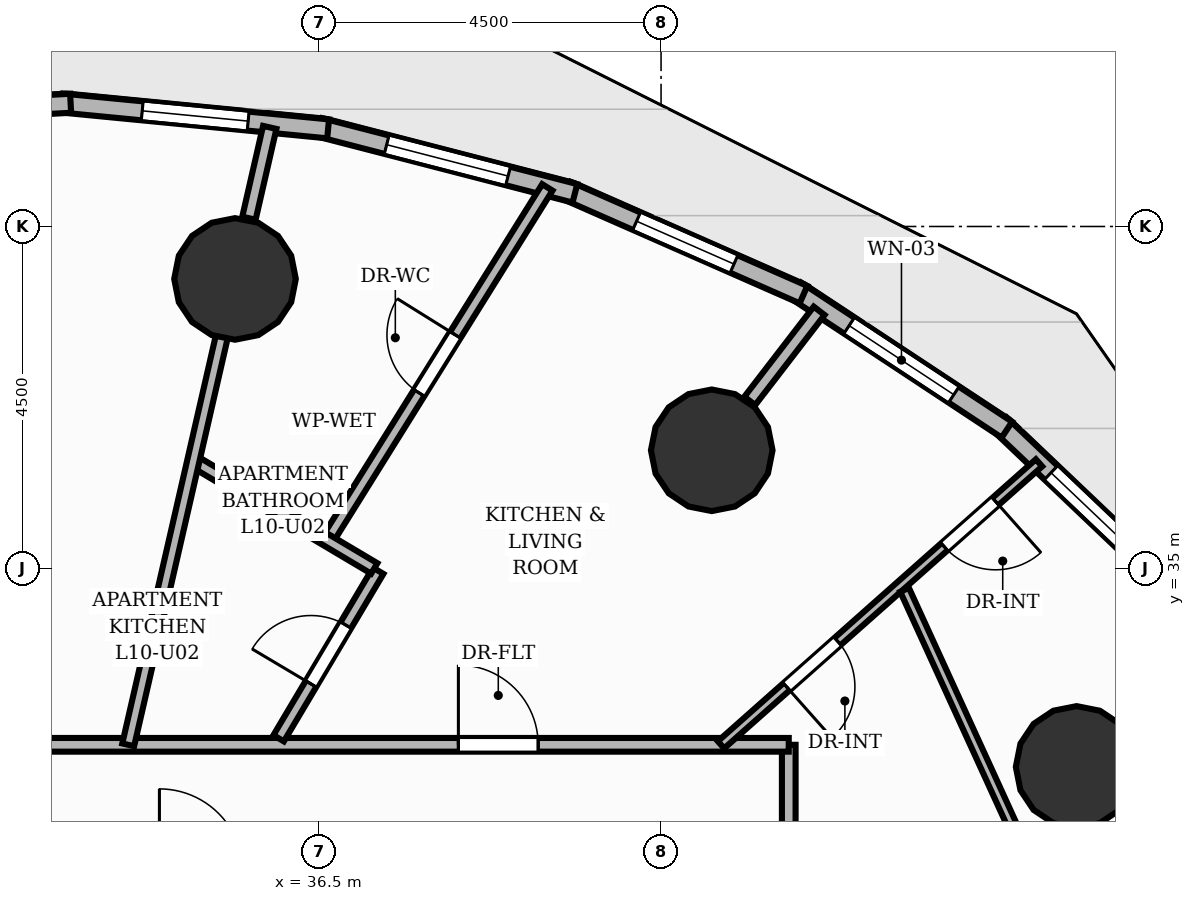
"""IFC4 building model, lengths in metres.
Left out: names, types, materials, properties, quantities, classifications, styles, units other than length and angle.
Written with IfcOpenShell. Run it as: python <this file> out.ifc"""

import sys

from ifc_helpers import new_model, si_unit, direction, frame, frame_2d, origin, origin_2d, place, context, subcontext, project, spatial, rectangle, circle, extrude, element, fill, save


model = new_model("IFC4")
c1 = context("Model", 3, precision=1e-05, world=origin(), true_north=direction((0.0, 1.0)))
c2 = subcontext(c1, "Body", "Model", "MODEL_VIEW")
j1 = project(units=[si_unit("LENGTHUNIT", "METRE"), si_unit("PLANEANGLEUNIT", "RADIAN")], contexts=[c1])
p1 = place(None, origin())
s1 = spatial("IfcSite", under=j1, at=p1, CompositionType="ELEMENT")
p2 = place(p1, origin())
s2 = spatial("IfcBuilding", under=s1, at=p2, CompositionType="ELEMENT")
p3 = place(p2, frame((0.0, 0.0, 37.6)))
s3 = spatial("IfcBuildingStorey", under=s2, at=p3, CompositionType="ELEMENT", Elevation=37.6)
for number, where, z_axis, x_axis in (
    (1, (46.468, 32.389, 0.0), (0.0, 0.0, 1.0), (1.0, 0.0, 0.0)),
    (2, (41.667, 36.555, 0.0), (0.0, 0.0, 1.0), (1.0, 0.0, 0.0)),
    (3, (35.395, 38.81, 0.0), (0.0, 0.0, 1.0), (1.0, 0.0, 0.0)),
):
    element("IfcColumn", number, at=place(p3, frame(where, z_axis=z_axis, x_axis=x_axis)), inside=s3, PredefinedType="COLUMN", context=c2, shape_type="SweptSolid", body=[
        extrude(circle(Radius=0.8, at=origin_2d()), origin(), (0.0, 0.0, 1.0), 3.2),
    ])
p4 = place(p3, frame((45.462, 36.896, 0.0), z_axis=(0.0, 0.0, 1.0), x_axis=(0.724569059836, -0.689202203659, 0.0)))
e4 = element("IfcWall", 4, at=p4, inside=s3, PredefinedType="SOLIDWALL", context=c2, shape_type="SweptSolid", body=[
    extrude(rectangle(XDim=3.244, YDim=0.25, at=frame_2d((1.622, 0.0))), origin(), (0.0, 0.0, 1.0), 2.96),
])
p5 = place(p4, frame((0.922, 0.0, 0.85)))
e5 = element("IfcOpeningElement", 5, at=p5, cuts=e4, PredefinedType="OPENING", context=c2, shape_type="SweptSolid", body=[
    extrude(rectangle(XDim=1.4, YDim=1.55, at=frame_2d((0.7, 0.775))), frame((0.0, 0.135, 0.0), z_axis=(0.0, -1.0, 0.0), x_axis=(1.0, 0.0, 0.0)), (0.0, 0.0, 1.0), 0.27),
])
p6 = place(p3, frame((42.777, 38.656, 0.0), z_axis=(0.0, 0.0, 1.0), x_axis=(0.834663448541, -0.550760317805, 0.0)))
e6 = element("IfcWall", 6, at=p6, inside=s3, PredefinedType="SOLIDWALL", context=c2, shape_type="SweptSolid", body=[
    extrude(rectangle(XDim=3.323, YDim=0.25, at=frame_2d((1.661, 0.0))), origin(), (0.0, 0.0, 1.0), 2.96),
])
p7 = place(p6, frame((0.836, 0.0, 0.85)))
e7 = element("IfcOpeningElement", 7, at=p7, cuts=e6, PredefinedType="OPENING", context=c2, shape_type="SweptSolid", body=[
    extrude(rectangle(XDim=1.65, YDim=1.55, at=frame_2d((0.825, 0.775))), frame((0.0, 0.135, 0.0), z_axis=(0.0, -1.0, 0.0), x_axis=(1.0, 0.0, 0.0)), (0.0, 0.0, 1.0), 0.27),
])
p8 = place(p3, frame((39.763, 39.972, 0.0), z_axis=(0.0, 0.0, 1.0), x_axis=(0.915312914138, -0.402743428515, 0.0)))
e8 = element("IfcWall", 8, at=p8, inside=s3, PredefinedType="SOLIDWALL", context=c2, shape_type="SweptSolid", body=[
    extrude(rectangle(XDim=3.399, YDim=0.25, at=frame_2d((1.699, 0.0))), origin(), (0.0, 0.0, 1.0), 2.96),
])
p9 = place(p8, frame((1.0, 0.0, 0.85)))
e9 = element("IfcOpeningElement", 9, at=p9, cuts=e8, PredefinedType="OPENING", context=c2, shape_type="SweptSolid", body=[
    extrude(rectangle(XDim=1.4, YDim=1.55, at=frame_2d((0.7, 0.775))), frame((0.0, 0.135, 0.0), z_axis=(0.0, -1.0, 0.0), x_axis=(1.0, 0.0, 0.0)), (0.0, 0.0, 1.0), 0.27),
])
p10 = place(p3, frame((36.512, 40.803, 0.0), z_axis=(0.0, 0.0, 1.0), x_axis=(0.968176058434, -0.250270093848, 0.0)))
e10 = element("IfcWall", 10, at=p10, inside=s3, PredefinedType="SOLIDWALL", context=c2, shape_type="SweptSolid", body=[
    extrude(rectangle(XDim=3.465, YDim=0.25, at=frame_2d((1.732, 0.0))), origin(), (0.0, 0.0, 1.0), 2.96),
])
p11 = place(p10, frame((0.907, 0.0, 0.85)))
e11 = element("IfcOpeningElement", 11, at=p11, cuts=e10, PredefinedType="OPENING", context=c2, shape_type="SweptSolid", body=[
    extrude(rectangle(XDim=1.65, YDim=1.55, at=frame_2d((0.825, 0.775))), frame((0.0, 0.135, 0.0), z_axis=(0.0, -1.0, 0.0), x_axis=(1.0, 0.0, 0.0)), (0.0, 0.0, 1.0), 0.27),
])
p12 = place(p3, frame((33.123, 41.124, 0.0), z_axis=(0.0, 0.0, 1.0), x_axis=(0.995323323337, -0.096599596386, 0.0)))
e12 = element("IfcWall", 12, at=p12, inside=s3, PredefinedType="SOLIDWALL", context=c2, shape_type="SweptSolid", body=[
    extrude(rectangle(XDim=3.513, YDim=0.25, at=frame_2d((1.756, 0.0))), origin(), (0.0, 0.0, 1.0), 2.96),
])
p13 = place(p12, frame((1.056, 0.0, 0.85)))
e13 = element("IfcOpeningElement", 13, at=p13, cuts=e12, PredefinedType="OPENING", context=c2, shape_type="SweptSolid", body=[
    extrude(rectangle(XDim=1.4, YDim=1.29, at=frame_2d((0.7, 0.645))), frame((0.0, 0.135, 0.0), z_axis=(0.0, -1.0, 0.0), x_axis=(1.0, 0.0, 0.0)), (0.0, 0.0, 1.0), 0.27),
])
p14 = place(p3, frame((29.699, 40.923, 0.0), z_axis=(0.0, 0.0, 1.0), x_axis=(0.998425121055, 0.056100602904, 0.0)))
e14 = element("IfcWall", 14, at=p14, inside=s3, PredefinedType="SOLIDWALL", context=c2, shape_type="SweptSolid", body=[
    extrude(rectangle(XDim=3.538, YDim=0.25, at=frame_2d((1.769, 0.0))), origin(), (0.0, 0.0, 1.0), 2.96),
])
p15 = place(p14, frame((1.194, 0.0, 0.0)))
e15 = element("IfcOpeningElement", 15, at=p15, cuts=e14, PredefinedType="OPENING", context=c2, shape_type="SweptSolid", body=[
    extrude(rectangle(XDim=1.15, YDim=2.2, at=frame_2d((0.575, 1.1))), frame((0.0, 0.135, 0.0), z_axis=(0.0, -1.0, 0.0), x_axis=(1.0, 0.0, 0.0)), (0.0, 0.0, 1.0), 0.27),
])
p16 = place(p3, frame((42.167, 37.205, 0.0), z_axis=(0.0, 0.0, 1.0), x_axis=(0.609978856004, 0.792417689876, 0.0)))
e16 = element("IfcWall", 16, at=p16, inside=s3, PredefinedType="PARTITIONING", context=c2, shape_type="SweptSolid", body=[
    extrude(rectangle(XDim=1.496, YDim=0.18, at=frame_2d((0.748, 0.0))), origin(), (0.0, 0.0, 1.0), 2.178),
])
p17 = place(p3, frame((35.578, 39.609, 0.0), z_axis=(0.0, 0.0, 1.0), x_axis=(0.223317008343, 0.974745871386, 0.0)))
e17 = element("IfcWall", 17, at=p17, inside=s3, PredefinedType="PARTITIONING", context=c2, shape_type="SweptSolid", body=[
    extrude(rectangle(XDim=1.226, YDim=0.18, at=frame_2d((0.613, 0.0))), origin(), (0.0, 0.0, 1.0), 2.178),
])
p18 = place(p3, frame((42.68, 32.68, 0.0), z_axis=(0.0, 0.0, 1.0), x_axis=(0.0, -1.0, 0.0)))
e18 = element("IfcWall", 18, at=p18, inside=s3, PredefinedType="PARTITIONING", context=c2, shape_type="SweptSolid", body=[
    extrude(rectangle(XDim=10.065, YDim=0.18, at=frame_2d((5.032, 0.0))), origin(), (0.0, 0.0, 1.0), 2.955),
])
p19 = place(p18, frame((7.374, 0.0, 0.0)))
e19 = element("IfcOpeningElement", 19, at=p19, cuts=e18, PredefinedType="OPENING", context=c2, shape_type="SweptSolid", body=[
    extrude(rectangle(XDim=0.9, YDim=2.1, at=frame_2d((0.45, 1.05))), frame((0.0, 0.1, 0.0), z_axis=(0.0, -1.0, 0.0), x_axis=(1.0, 0.0, 0.0)), (0.0, 0.0, 1.0), 0.2),
])
p20 = place(p3, frame((21.32, 32.68, 0.0), z_axis=(0.0, 0.0, 1.0), x_axis=(1.0, 0.0, 0.0)))
e20 = element("IfcWall", 20, at=p20, inside=s3, PredefinedType="PARTITIONING", context=c2, shape_type="SweptSolid", body=[
    extrude(rectangle(XDim=21.36, YDim=0.18, at=frame_2d((10.68, 0.0))), origin(), (0.0, 0.0, 1.0), 2.955),
])
p21 = place(p20, frame((17.013, 0.0, 0.0)))
e21 = element("IfcOpeningElement", 21, at=p21, cuts=e20, PredefinedType="OPENING", context=c2, shape_type="SweptSolid", body=[
    extrude(rectangle(XDim=1.05, YDim=2.15, at=frame_2d((0.525, 1.075))), frame((0.0, 0.1, 0.0), z_axis=(0.0, -1.0, 0.0), x_axis=(1.0, 0.0, 0.0)), (0.0, 0.0, 1.0), 0.2),
])
p22 = place(p20, frame((5.82, 0.0, 0.0)))
e22 = element("IfcOpeningElement", 22, at=p22, cuts=e20, PredefinedType="OPENING", context=c2, shape_type="SweptSolid", body=[
    extrude(rectangle(XDim=1.05, YDim=2.15, at=frame_2d((0.525, 1.075))), frame((0.0, 0.1, 0.0), z_axis=(0.0, -1.0, 0.0), x_axis=(1.0, 0.0, 0.0)), (0.0, 0.0, 1.0), 0.2),
])
p23 = place(p3, frame((36.607, 35.369, 0.0), z_axis=(0.0, 0.0, 1.0), x_axis=(0.529180994646, 0.848508971612, 0.0)))
e23 = element("IfcWall", 23, at=p23, inside=s3, PredefinedType="PLUMBINGWALL", context=c2, shape_type="SweptSolid", body=[
    extrude(rectangle(XDim=5.475, YDim=0.16, at=frame_2d((2.737, 0.0))), origin(), (0.0, 0.0, 1.0), 2.641),
])
p24 = place(p23, frame((2.288, 0.0, 0.0)))
e24 = element("IfcOpeningElement", 24, at=p24, cuts=e23, PredefinedType="OPENING", context=c2, shape_type="SweptSolid", body=[
    extrude(rectangle(XDim=0.9, YDim=2.1, at=frame_2d((0.45, 1.05))), frame((0.0, 0.09, 0.0), z_axis=(0.0, -1.0, 0.0), x_axis=(1.0, 0.0, 0.0)), (0.0, 0.0, 1.0), 0.18),
])
p25 = place(p3, frame((45.973, 36.39, 0.0), z_axis=(0.0, 0.0, 1.0), x_axis=(-0.748208515509, -0.663463651845, 0.0)))
e25 = element("IfcWall", 25, at=p25, inside=s3, PredefinedType="PARTITIONING", context=c2, shape_type="SweptSolid", body=[
    extrude(rectangle(XDim=5.592, YDim=0.125, at=frame_2d((2.796, 0.0))), origin(), (0.0, 0.0, 1.0), 2.955),
])
p26 = place(p25, frame((0.765, 0.0, 0.0)))
e26 = element("IfcOpeningElement", 26, at=p26, cuts=e25, PredefinedType="OPENING", context=c2, shape_type="SweptSolid", body=[
    extrude(rectangle(XDim=0.9, YDim=2.1, at=frame_2d((0.45, 1.05))), frame((0.0, 0.073, 0.0), z_axis=(0.0, -1.0, 0.0), x_axis=(1.0, 0.0, 0.0)), (0.0, 0.0, 1.0), 0.145),
])
p27 = place(p25, frame((3.54, 0.0, 0.0)))
e27 = element("IfcOpeningElement", 27, at=p27, cuts=e25, PredefinedType="OPENING", context=c2, shape_type="SweptSolid", body=[
    extrude(rectangle(XDim=0.9, YDim=2.1, at=frame_2d((0.45, 1.05))), frame((0.0, 0.073, 0.0), z_axis=(0.0, -1.0, 0.0), x_axis=(1.0, 0.0, 0.0)), (0.0, 0.0, 1.0), 0.145),
])
p28 = place(p3, frame((35.969, 32.766, 0.0), z_axis=(0.0, 0.0, 1.0), x_axis=(0.51079395194, 0.859703168926, 0.0)))
e28 = element("IfcWall", 28, at=p28, inside=s3, PredefinedType="PLUMBINGWALL", context=c2, shape_type="SweptSolid", body=[
    extrude(rectangle(XDim=2.564, YDim=0.16, at=frame_2d((1.282, 0.0))), origin(), (0.0, 0.0, 1.0), 2.955),
])
p29 = place(p28, frame((0.832, 0.0, 0.0)))
e29 = element("IfcOpeningElement", 29, at=p29, cuts=e28, PredefinedType="OPENING", context=c2, shape_type="SweptSolid", body=[
    extrude(rectangle(XDim=0.9, YDim=2.1, at=frame_2d((0.45, 1.05))), frame((0.0, 0.09, 0.0), z_axis=(0.0, -1.0, 0.0), x_axis=(1.0, 0.0, 0.0)), (0.0, 0.0, 1.0), 0.18),
])
p30 = place(p3, frame((37.227, 35.001, 0.0), z_axis=(0.0, 0.0, 1.0), x_axis=(-0.859670870998, 0.510848307776, 0.0)))
e30 = element("IfcWall", 30, at=p30, inside=s3, PredefinedType="PLUMBINGWALL", context=c2, shape_type="SweptSolid", body=[
    extrude(rectangle(XDim=2.77, YDim=0.16, at=frame_2d((1.385, 0.0))), origin(), (0.0, 0.0, 1.0), 2.955),
])
p31 = place(p3, frame((33.99, 32.68, 0.0), z_axis=(0.0, 0.0, 1.0), x_axis=(0.223435779217, 0.974718653031, 0.0)))
e31 = element("IfcWall", 31, at=p31, inside=s3, PredefinedType="PLUMBINGWALL", context=c2, shape_type="SweptSolid", body=[
    extrude(rectangle(XDim=5.511, YDim=0.16, at=frame_2d((2.756, 0.0))), origin(), (0.0, 0.0, 1.0), 2.178),
])
p32 = place(p3, frame((47.81, 26.827, 0.0), z_axis=(0.0, 0.0, 1.0), x_axis=(-0.41559351113, 0.909550456823, 0.0)))
e32 = element("IfcWall", 32, at=p32, inside=s3, PredefinedType="PARTITIONING", context=c2, shape_type="SweptSolid", body=[
    extrude(rectangle(XDim=8.677, YDim=0.125, at=frame_2d((4.338, 0.0))), origin(), (0.0, 0.0, 1.0), 2.328),
])
p33 = place(p5, origin())
e33 = element("IfcWindow", 33, at=p33, inside=s3, PartitioningType="SINGLE_PANEL", PredefinedType="WINDOW", context=c2, shape_type="SweptSolid", body=[
    extrude(rectangle(XDim=1.4, YDim=1.55, at=frame_2d((0.7, 0.775))), frame((0.0, 0.03, 0.0), z_axis=(0.0, -1.0, 0.0), x_axis=(1.0, 0.0, 0.0)), (0.0, 0.0, 1.0), 0.06),
])
fill(e5, e33)
p34 = place(p7, origin())
e34 = element("IfcWindow", 34, at=p34, inside=s3, PartitioningType="SINGLE_PANEL", PredefinedType="WINDOW", context=c2, shape_type="SweptSolid", body=[
    extrude(rectangle(XDim=1.65, YDim=1.55, at=frame_2d((0.825, 0.775))), frame((0.0, 0.03, 0.0), z_axis=(0.0, -1.0, 0.0), x_axis=(1.0, 0.0, 0.0)), (0.0, 0.0, 1.0), 0.06),
])
fill(e7, e34)
p35 = place(p9, origin())
e35 = element("IfcWindow", 35, at=p35, inside=s3, PartitioningType="SINGLE_PANEL", PredefinedType="WINDOW", context=c2, shape_type="SweptSolid", body=[
    extrude(rectangle(XDim=1.4, YDim=1.55, at=frame_2d((0.7, 0.775))), frame((0.0, 0.03, 0.0), z_axis=(0.0, -1.0, 0.0), x_axis=(1.0, 0.0, 0.0)), (0.0, 0.0, 1.0), 0.06),
])
fill(e9, e35)
p36 = place(p11, origin())
e36 = element("IfcWindow", 36, at=p36, inside=s3, PartitioningType="SINGLE_PANEL", PredefinedType="WINDOW", context=c2, shape_type="SweptSolid", body=[
    extrude(rectangle(XDim=1.65, YDim=1.55, at=frame_2d((0.825, 0.775))), frame((0.0, 0.03, 0.0), z_axis=(0.0, -1.0, 0.0), x_axis=(1.0, 0.0, 0.0)), (0.0, 0.0, 1.0), 0.06),
])
fill(e11, e36)
p37 = place(p13, origin())
e37 = element("IfcWindow", 37, at=p37, inside=s3, PartitioningType="SINGLE_PANEL", PredefinedType="WINDOW", context=c2, shape_type="SweptSolid", body=[
    extrude(rectangle(XDim=1.4, YDim=1.29, at=frame_2d((0.7, 0.645))), frame((0.0, 0.03, 0.0), z_axis=(0.0, -1.0, 0.0), x_axis=(1.0, 0.0, 0.0)), (0.0, 0.0, 1.0), 0.06),
])
fill(e13, e37)
p38 = place(p21, origin())
e38 = element("IfcDoor", 38, at=p38, inside=s3, OperationType="SINGLE_SWING_LEFT", PredefinedType="DOOR", context=c2, shape_type="SweptSolid", body=[
    extrude(rectangle(XDim=1.05, YDim=2.15, at=frame_2d((0.525, 1.075))), frame((0.0, 0.025, 0.0), z_axis=(0.0, -1.0, 0.0), x_axis=(1.0, 0.0, 0.0)), (0.0, 0.0, 1.0), 0.05),
])
fill(e21, e38)
p39 = place(p24, origin())
e39 = element("IfcDoor", 39, at=p39, inside=s3, OperationType="SINGLE_SWING_RIGHT", PredefinedType="DOOR", context=c2, shape_type="SweptSolid", body=[
    extrude(rectangle(XDim=0.9, YDim=2.1, at=frame_2d((0.45, 1.05))), frame((0.0, 0.025, 0.0), z_axis=(0.0, -1.0, 0.0), x_axis=(1.0, 0.0, 0.0)), (0.0, 0.0, 1.0), 0.05),
])
fill(e24, e39)
p40 = place(p26, origin())
e40 = element("IfcDoor", 40, at=p40, inside=s3, OperationType="SINGLE_SWING_LEFT", PredefinedType="DOOR", context=c2, shape_type="SweptSolid", body=[
    extrude(rectangle(XDim=0.9, YDim=2.1, at=frame_2d((0.45, 1.05))), frame((0.0, 0.025, 0.0), z_axis=(0.0, -1.0, 0.0), x_axis=(1.0, 0.0, 0.0)), (0.0, 0.0, 1.0), 0.05),
])
fill(e26, e40)
p41 = place(p27, origin())
e41 = element("IfcDoor", 41, at=p41, inside=s3, OperationType="SINGLE_SWING_RIGHT", PredefinedType="DOOR", context=c2, shape_type="SweptSolid", body=[
    extrude(rectangle(XDim=0.9, YDim=2.1, at=frame_2d((0.45, 1.05))), frame((0.0, 0.025, 0.0), z_axis=(0.0, -1.0, 0.0), x_axis=(1.0, 0.0, 0.0)), (0.0, 0.0, 1.0), 0.05),
])
fill(e27, e41)
p42 = place(p29, origin())
e42 = element("IfcDoor", 42, at=p42, inside=s3, OperationType="SINGLE_SWING_LEFT", PredefinedType="DOOR", context=c2, shape_type="SweptSolid", body=[
    extrude(rectangle(XDim=0.9, YDim=2.1, at=frame_2d((0.45, 1.05))), frame((0.0, 0.025, 0.0), z_axis=(0.0, -1.0, 0.0), x_axis=(1.0, 0.0, 0.0)), (0.0, 0.0, 1.0), 0.05),
])
fill(e29, e42)
save(model, sys.argv[1])
